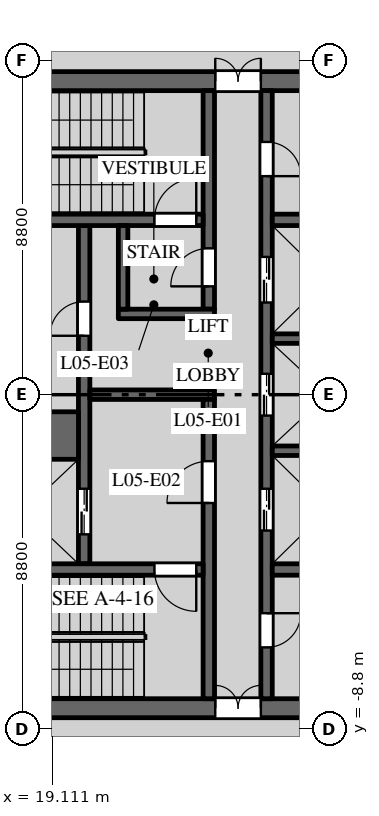
"""IFC4 building model, lengths in metres.
Left out: names, types, materials, properties, quantities, classifications, styles, units other than length and angle.
Written with IfcOpenShell. Run it as: python <this file> out.ifc"""

import sys

from ifc_helpers import new_model, si_unit, direction, frame, frame_2d, origin, place, context, subcontext, project, spatial, rectangle, extrude, element, fill, save


model = new_model("IFC4")
c1 = context("Model", 3, precision=1e-05, world=origin(), true_north=direction((0.0, 1.0)))
c2 = subcontext(c1, "Body", "Model", "MODEL_VIEW")
j1 = project(units=[si_unit("LENGTHUNIT", "METRE"), si_unit("PLANEANGLEUNIT", "RADIAN")], contexts=[c1])
p1 = place(None, origin())
s1 = spatial("IfcSite", under=j1, at=p1, CompositionType="ELEMENT")
p2 = place(p1, origin())
s2 = spatial("IfcBuilding", under=s1, at=p2, CompositionType="ELEMENT")
p3 = place(p2, frame((0.0, 0.0, 30.5)))
s3 = spatial("IfcBuildingStorey", under=s2, at=p3, CompositionType="ELEMENT", Elevation=30.5)
p4 = place(p3, frame((16.5, 8.25, 0.0), z_axis=(0.0, 0.0, 1.0), x_axis=(1.0, 0.0, 0.0)))
e1 = element("IfcWall", 1, at=p4, inside=s3, PredefinedType="SHEAR", context=c2, shape_type="SweptSolid", body=[
    extrude(rectangle(XDim=15.0, YDim=0.5, at=frame_2d((7.5, 0.0))), origin(), (0.0, 0.0, 1.0), 3.7),
])
p5 = place(p4, frame((6.9, 0.0, 0.0)))
e2 = element("IfcOpeningElement", 2, at=p5, cuts=e1, PredefinedType="OPENING", context=c2, shape_type="SweptSolid", body=[
    extrude(rectangle(XDim=1.2, YDim=2.1, at=frame_2d((0.6, 1.05))), frame((0.0, 0.26, 0.0), z_axis=(0.0, -1.0, 0.0), x_axis=(1.0, 0.0, 0.0)), (0.0, 0.0, 1.0), 0.52),
])
p6 = place(p4, frame((12.05, 0.0, 0.0)))
e3 = element("IfcOpeningElement", 3, at=p6, cuts=e1, PredefinedType="OPENING", context=c2, shape_type="SweptSolid", body=[
    extrude(rectangle(XDim=0.9, YDim=2.1, at=frame_2d((0.45, 1.05))), frame((0.0, 0.26, 0.0), z_axis=(0.0, -1.0, 0.0), x_axis=(1.0, 0.0, 0.0)), (0.0, 0.0, 1.0), 0.52),
])
p7 = place(p3, frame((16.5, -8.25, 0.0), z_axis=(0.0, 0.0, 1.0), x_axis=(1.0, 0.0, 0.0)))
e4 = element("IfcWall", 4, at=p7, inside=s3, PredefinedType="SHEAR", context=c2, shape_type="SweptSolid", body=[
    extrude(rectangle(XDim=15.0, YDim=0.5, at=frame_2d((7.5, 0.0))), origin(), (0.0, 0.0, 1.0), 3.7),
])
p8 = place(p7, frame((6.9, 0.0, 0.0)))
e5 = element("IfcOpeningElement", 5, at=p8, cuts=e4, PredefinedType="OPENING", context=c2, shape_type="SweptSolid", body=[
    extrude(rectangle(XDim=1.2, YDim=2.1, at=frame_2d((0.6, 1.05))), frame((0.0, 0.26, 0.0), z_axis=(0.0, -1.0, 0.0), x_axis=(1.0, 0.0, 0.0)), (0.0, 0.0, 1.0), 0.52),
])
p9 = place(p7, frame((12.425, 0.0, 0.0)))
e6 = element("IfcOpeningElement", 6, at=p9, cuts=e4, PredefinedType="OPENING", context=c2, shape_type="SweptSolid", body=[
    extrude(rectangle(XDim=0.9, YDim=2.1, at=frame_2d((0.45, 1.05))), frame((0.0, 0.26, 0.0), z_axis=(0.0, -1.0, 0.0), x_axis=(1.0, 0.0, 0.0)), (0.0, 0.0, 1.0), 0.52),
])
p10 = place(p3, frame((19.95, -4.45, 0.0), z_axis=(0.0, 0.0, 1.0), x_axis=(0.0, 1.0, 0.0)))
e7 = element("IfcWall", 7, at=p10, inside=s3, PredefinedType="SHEAR", context=c2, shape_type="SweptSolid", body=[
    extrude(rectangle(XDim=8.9, YDim=0.3, at=frame_2d((4.45, 0.0))), origin(), (0.0, 0.0, 1.0), 3.7),
])
p11 = place(p10, frame((0.775, 0.0, 0.0)))
e8 = element("IfcOpeningElement", 8, at=p11, cuts=e7, PredefinedType="OPENING", context=c2, shape_type="SweptSolid", body=[
    extrude(rectangle(XDim=1.2, YDim=2.1, at=frame_2d((0.6, 1.05))), frame((0.0, 0.16, 0.0), z_axis=(0.0, -1.0, 0.0), x_axis=(1.0, 0.0, 0.0)), (0.0, 0.0, 1.0), 0.32),
])
p12 = place(p10, frame((6.0, 0.0, 0.0)))
e9 = element("IfcOpeningElement", 9, at=p12, cuts=e7, PredefinedType="OPENING", context=c2, shape_type="SweptSolid", body=[
    extrude(rectangle(XDim=0.9, YDim=2.1, at=frame_2d((0.45, 1.05))), frame((0.0, 0.16, 0.0), z_axis=(0.0, -1.0, 0.0), x_axis=(1.0, 0.0, 0.0)), (0.0, 0.0, 1.0), 0.32),
])
p13 = place(p3, frame((24.75, -8.0, 0.0), z_axis=(0.0, 0.0, 1.0), x_axis=(0.0, 1.0, 0.0)))
e10 = element("IfcWall", 10, at=p13, inside=s3, PredefinedType="SHEAR", context=c2, shape_type="SweptSolid", body=[
    extrude(rectangle(XDim=16.0, YDim=0.3, at=frame_2d((8.0, 0.0))), origin(), (0.0, 0.0, 1.0), 3.7),
])
p14 = place(p13, frame((4.425, 0.0, 0.0)))
e11 = element("IfcOpeningElement", 11, at=p14, cuts=e10, PredefinedType="OPENING", context=c2, shape_type="SweptSolid", body=[
    extrude(rectangle(XDim=1.1, YDim=2.1, at=frame_2d((0.55, 1.05))), frame((0.0, 0.16, 0.0), z_axis=(0.0, -1.0, 0.0), x_axis=(1.0, 0.0, 0.0)), (0.0, 0.0, 1.0), 0.32),
])
p15 = place(p13, frame((7.45, 0.0, 0.0)))
e12 = element("IfcOpeningElement", 12, at=p15, cuts=e10, PredefinedType="OPENING", context=c2, shape_type="SweptSolid", body=[
    extrude(rectangle(XDim=1.1, YDim=2.1, at=frame_2d((0.55, 1.05))), frame((0.0, 0.16, 0.0), z_axis=(0.0, -1.0, 0.0), x_axis=(1.0, 0.0, 0.0)), (0.0, 0.0, 1.0), 0.32),
])
p16 = place(p13, frame((10.425, 0.0, 0.0)))
e13 = element("IfcOpeningElement", 13, at=p16, cuts=e10, PredefinedType="OPENING", context=c2, shape_type="SweptSolid", body=[
    extrude(rectangle(XDim=1.2, YDim=2.1, at=frame_2d((0.6, 1.05))), frame((0.0, 0.16, 0.0), z_axis=(0.0, -1.0, 0.0), x_axis=(1.0, 0.0, 0.0)), (0.0, 0.0, 1.0), 0.32),
])
p17 = place(p13, frame((13.75, 0.0, 0.0)))
e14 = element("IfcOpeningElement", 14, at=p17, cuts=e10, PredefinedType="OPENING", context=c2, shape_type="SweptSolid", body=[
    extrude(rectangle(XDim=0.9, YDim=2.1, at=frame_2d((0.45, 1.05))), frame((0.0, 0.16, 0.0), z_axis=(0.0, -1.0, 0.0), x_axis=(1.0, 0.0, 0.0)), (0.0, 0.0, 1.0), 0.32),
])
p18 = place(p13, frame((1.35, 0.0, 0.0)))
e15 = element("IfcOpeningElement", 15, at=p18, cuts=e10, PredefinedType="OPENING", context=c2, shape_type="SweptSolid", body=[
    extrude(rectangle(XDim=0.9, YDim=2.1, at=frame_2d((0.45, 1.05))), frame((0.0, 0.16, 0.0), z_axis=(0.0, -1.0, 0.0), x_axis=(1.0, 0.0, 0.0)), (0.0, 0.0, 1.0), 0.32),
])
p19 = place(p3, frame((20.1, 0.0, 0.0), z_axis=(0.0, 0.0, 1.0), x_axis=(1.0, 0.0, 0.0)))
e16 = element("IfcWall", 16, at=p19, inside=s3, PredefinedType="SHEAR", context=c2, shape_type="SweptSolid", body=[
    extrude(rectangle(XDim=3.28, YDim=0.25, at=frame_2d((1.64, 0.0))), origin(), (0.0, 0.0, 1.0), 3.7),
])
p20 = place(p3, frame((24.9, 4.6, 0.0), z_axis=(0.0, 0.0, 1.0), x_axis=(1.0, 0.0, 0.0)))
e17 = element("IfcWall", 17, at=p20, inside=s3, PredefinedType="SHEAR", context=c2, shape_type="SweptSolid", body=[
    extrude(rectangle(XDim=6.1, YDim=0.3, at=frame_2d((3.05, 0.0))), origin(), (0.0, 0.0, 1.0), 3.7),
])
p21 = place(p20, frame((4.2, 0.0, 0.0)))
e18 = element("IfcOpeningElement", 18, at=p21, cuts=e17, PredefinedType="OPENING", context=c2, shape_type="SweptSolid", body=[
    extrude(rectangle(XDim=0.9, YDim=2.1, at=frame_2d((0.45, 1.05))), frame((0.0, 0.16, 0.0), z_axis=(0.0, -1.0, 0.0), x_axis=(1.0, 0.0, 0.0)), (0.0, 0.0, 1.0), 0.32),
])
p22 = place(p3, frame((24.9, -4.6, 0.0), z_axis=(0.0, 0.0, 1.0), x_axis=(1.0, 0.0, 0.0)))
e19 = element("IfcWall", 19, at=p22, inside=s3, PredefinedType="SHEAR", context=c2, shape_type="SweptSolid", body=[
    extrude(rectangle(XDim=6.1, YDim=0.3, at=frame_2d((3.05, 0.0))), origin(), (0.0, 0.0, 1.0), 3.7),
])
p23 = place(p3, frame((16.9, -1.075, 0.0), z_axis=(0.0, 0.0, 1.0), x_axis=(1.0, 0.0, 0.0)))
e20 = element("IfcWall", 20, at=p23, inside=s3, PredefinedType="SHEAR", context=c2, shape_type="SweptSolid", body=[
    extrude(rectangle(XDim=2.9, YDim=1.25, at=frame_2d((1.45, 0.0))), origin(), (0.0, 0.0, 1.0), 3.7),
])
for number, where, z_axis, x_axis in (
    (21, (24.9, -1.475, 0.0), (0.0, 0.0, 1.0), (1.0, 0.0, 0.0)),
    (22, (24.9, 1.475, 0.0), (0.0, 0.0, 1.0), (1.0, 0.0, 0.0)),
):
    element("IfcWall", number, at=place(p3, frame(where, z_axis=z_axis, x_axis=x_axis)), inside=s3, PredefinedType="SHEAR", context=c2, shape_type="SweptSolid", body=[
        extrude(rectangle(XDim=2.9, YDim=0.25, at=frame_2d((1.45, 0.0))), origin(), (0.0, 0.0, 1.0), 3.7),
    ])
p24 = place(p3, frame((23.23, 2.25, 0.0), z_axis=(0.0, 0.0, 1.0), x_axis=(0.0, 1.0, 0.0)))
e23 = element("IfcWall", 23, at=p24, inside=s3, PredefinedType="SHEAR", context=c2, shape_type="SweptSolid", body=[
    extrude(rectangle(XDim=5.75, YDim=0.3, at=frame_2d((2.875, 0.0))), origin(), (0.0, 0.0, 1.0), 3.7),
])
p25 = place(p24, frame((0.6, 0.0, 0.0)))
e24 = element("IfcOpeningElement", 24, at=p25, cuts=e23, PredefinedType="OPENING", context=c2, shape_type="SweptSolid", body=[
    extrude(rectangle(XDim=1.0, YDim=2.1, at=frame_2d((0.5, 1.05))), frame((0.0, 0.16, 0.0), z_axis=(0.0, -1.0, 0.0), x_axis=(1.0, 0.0, 0.0)), (0.0, 0.0, 1.0), 0.32),
])
p26 = place(p3, frame((23.23, -8.0, 0.0), z_axis=(0.0, 0.0, 1.0), x_axis=(0.0, 1.0, 0.0)))
e25 = element("IfcWall", 25, at=p26, inside=s3, PredefinedType="SHEAR", context=c2, shape_type="SweptSolid", body=[
    extrude(rectangle(XDim=7.875, YDim=0.3, at=frame_2d((3.938, 0.0))), origin(), (0.0, 0.0, 1.0), 3.7),
])
p27 = place(p26, frame((5.15, 0.0, 0.0)))
e26 = element("IfcOpeningElement", 26, at=p27, cuts=e25, PredefinedType="OPENING", context=c2, shape_type="SweptSolid", body=[
    extrude(rectangle(XDim=1.1, YDim=2.1, at=frame_2d((0.55, 1.05))), frame((0.0, 0.16, 0.0), z_axis=(0.0, -1.0, 0.0), x_axis=(1.0, 0.0, 0.0)), (0.0, 0.0, 1.0), 0.32),
])
p28 = place(p3, frame((16.9, 4.6, 0.0), z_axis=(0.0, 0.0, 1.0), x_axis=(1.0, 0.0, 0.0)))
e27 = element("IfcWall", 27, at=p28, inside=s3, PredefinedType="SHEAR", context=c2, shape_type="SweptSolid", body=[
    extrude(rectangle(XDim=6.18, YDim=0.3, at=frame_2d((3.09, 0.0))), origin(), (0.0, 0.0, 1.0), 3.7),
])
p29 = place(p28, frame((4.9, 0.0, 0.0)))
e28 = element("IfcOpeningElement", 28, at=p29, cuts=e27, PredefinedType="OPENING", context=c2, shape_type="SweptSolid", body=[
    extrude(rectangle(XDim=1.1, YDim=2.1, at=frame_2d((0.55, 1.05))), frame((0.0, 0.16, 0.0), z_axis=(0.0, -1.0, 0.0), x_axis=(1.0, 0.0, 0.0)), (0.0, 0.0, 1.0), 0.32),
])
p30 = place(p3, frame((16.9, -4.6, 0.0), z_axis=(0.0, 0.0, 1.0), x_axis=(1.0, 0.0, 0.0)))
e29 = element("IfcWall", 29, at=p30, inside=s3, PredefinedType="SHEAR", context=c2, shape_type="SweptSolid", body=[
    extrude(rectangle(XDim=6.18, YDim=0.3, at=frame_2d((3.09, 0.0))), origin(), (0.0, 0.0, 1.0), 3.7),
])
p31 = place(p30, frame((4.9, 0.0, 0.0)))
e30 = element("IfcOpeningElement", 30, at=p31, cuts=e29, PredefinedType="OPENING", context=c2, shape_type="SweptSolid", body=[
    extrude(rectangle(XDim=1.1, YDim=2.1, at=frame_2d((0.55, 1.05))), frame((0.0, 0.16, 0.0), z_axis=(0.0, -1.0, 0.0), x_axis=(1.0, 0.0, 0.0)), (0.0, 0.0, 1.0), 0.32),
])
p32 = place(p3, frame((20.85, 2.125, 0.0), z_axis=(0.0, 0.0, 1.0), x_axis=(1.0, 0.0, 0.0)))
e31 = element("IfcWall", 31, at=p32, inside=s3, PredefinedType="SHEAR", context=c2, shape_type="SweptSolid", body=[
    extrude(rectangle(XDim=2.53, YDim=0.25, at=frame_2d((1.265, 0.0))), origin(), (0.0, 0.0, 1.0), 3.7),
])
p33 = place(p3, frame((20.975, 2.25, 0.0), z_axis=(0.0, 0.0, 1.0), x_axis=(0.0, 1.0, 0.0)))
e32 = element("IfcWall", 32, at=p33, inside=s3, PredefinedType="SHEAR", context=c2, shape_type="SweptSolid", body=[
    extrude(rectangle(XDim=2.2, YDim=0.25, at=frame_2d((1.1, 0.0))), origin(), (0.0, 0.0, 1.0), 3.7),
])
p34 = place(p11, origin())
e33 = element("IfcDoor", 33, at=p34, inside=s3, OperationType="DOUBLE_DOOR_SLIDING", PredefinedType="DOOR", context=c2, shape_type="SweptSolid", body=[
    extrude(rectangle(XDim=1.2, YDim=2.1, at=frame_2d((0.6, 1.05))), frame((0.0, 0.025, 0.0), z_axis=(0.0, -1.0, 0.0), x_axis=(1.0, 0.0, 0.0)), (0.0, 0.0, 1.0), 0.05),
])
fill(e8, e33)
p35 = place(p14, origin())
e34 = element("IfcDoor", 34, at=p35, inside=s3, OperationType="DOUBLE_DOOR_SLIDING", PredefinedType="DOOR", context=c2, shape_type="SweptSolid", body=[
    extrude(rectangle(XDim=1.1, YDim=2.1, at=frame_2d((0.55, 1.05))), frame((0.0, 0.025, 0.0), z_axis=(0.0, -1.0, 0.0), x_axis=(1.0, 0.0, 0.0)), (0.0, 0.0, 1.0), 0.05),
])
fill(e11, e34)
p36 = place(p15, origin())
e35 = element("IfcDoor", 35, at=p36, inside=s3, OperationType="DOUBLE_DOOR_SLIDING", PredefinedType="DOOR", context=c2, shape_type="SweptSolid", body=[
    extrude(rectangle(XDim=1.1, YDim=2.1, at=frame_2d((0.55, 1.05))), frame((0.0, 0.025, 0.0), z_axis=(0.0, -1.0, 0.0), x_axis=(1.0, 0.0, 0.0)), (0.0, 0.0, 1.0), 0.05),
])
fill(e12, e35)
p37 = place(p16, origin())
e36 = element("IfcDoor", 36, at=p37, inside=s3, OperationType="DOUBLE_DOOR_SLIDING", PredefinedType="DOOR", context=c2, shape_type="SweptSolid", body=[
    extrude(rectangle(XDim=1.2, YDim=2.1, at=frame_2d((0.6, 1.05))), frame((0.0, 0.025, 0.0), z_axis=(0.0, -1.0, 0.0), x_axis=(1.0, 0.0, 0.0)), (0.0, 0.0, 1.0), 0.05),
])
fill(e13, e36)
p38 = place(p29, origin())
e37 = element("IfcDoor", 37, at=p38, inside=s3, OperationType="SINGLE_SWING_LEFT", PredefinedType="DOOR", context=c2, shape_type="SweptSolid", body=[
    extrude(rectangle(XDim=1.1, YDim=2.1, at=frame_2d((0.55, 1.05))), frame((0.0, 0.025, 0.0), z_axis=(0.0, -1.0, 0.0), x_axis=(1.0, 0.0, 0.0)), (0.0, 0.0, 1.0), 0.05),
])
fill(e28, e37)
p39 = place(p31, origin())
e38 = element("IfcDoor", 38, at=p39, inside=s3, OperationType="SINGLE_SWING_RIGHT", PredefinedType="DOOR", context=c2, shape_type="SweptSolid", body=[
    extrude(rectangle(XDim=1.1, YDim=2.1, at=frame_2d((0.55, 1.05))), frame((0.0, 0.025, 0.0), z_axis=(0.0, -1.0, 0.0), x_axis=(1.0, 0.0, 0.0)), (0.0, 0.0, 1.0), 0.05),
])
fill(e30, e38)
p40 = place(p27, origin())
e39 = element("IfcDoor", 39, at=p40, inside=s3, OperationType="SINGLE_SWING_RIGHT", PredefinedType="DOOR", context=c2, shape_type="SweptSolid", body=[
    extrude(rectangle(XDim=1.1, YDim=2.1, at=frame_2d((0.55, 1.05))), frame((0.0, 0.025, 0.0), z_axis=(0.0, -1.0, 0.0), x_axis=(1.0, 0.0, 0.0)), (0.0, 0.0, 1.0), 0.05),
])
fill(e26, e39)
p41 = place(p25, origin())
e40 = element("IfcDoor", 40, at=p41, inside=s3, OperationType="SINGLE_SWING_RIGHT", PredefinedType="DOOR", context=c2, shape_type="SweptSolid", body=[
    extrude(rectangle(XDim=1.0, YDim=2.1, at=frame_2d((0.5, 1.05))), frame((0.0, 0.025, 0.0), z_axis=(0.0, -1.0, 0.0), x_axis=(1.0, 0.0, 0.0)), (0.0, 0.0, 1.0), 0.05),
])
fill(e24, e40)
p42 = place(p5, origin())
e41 = element("IfcDoor", 41, at=p42, inside=s3, OperationType="DOUBLE_DOOR_DOUBLE_SWING", PredefinedType="DOOR", context=c2, shape_type="SweptSolid", body=[
    extrude(rectangle(XDim=1.2, YDim=2.1, at=frame_2d((0.6, 1.05))), frame((0.0, 0.025, 0.0), z_axis=(0.0, -1.0, 0.0), x_axis=(1.0, 0.0, 0.0)), (0.0, 0.0, 1.0), 0.05),
])
fill(e2, e41)
p43 = place(p8, origin())
e42 = element("IfcDoor", 42, at=p43, inside=s3, OperationType="DOUBLE_DOOR_DOUBLE_SWING", PredefinedType="DOOR", context=c2, shape_type="SweptSolid", body=[
    extrude(rectangle(XDim=1.2, YDim=2.1, at=frame_2d((0.6, 1.05))), frame((0.0, 0.025, 0.0), z_axis=(0.0, -1.0, 0.0), x_axis=(1.0, 0.0, 0.0)), (0.0, 0.0, 1.0), 0.05),
])
fill(e5, e42)
p44 = place(p12, origin())
e43 = element("IfcDoor", 43, at=p44, inside=s3, OperationType="SINGLE_SWING_RIGHT", PredefinedType="DOOR", context=c2, shape_type="SweptSolid", body=[
    extrude(rectangle(XDim=0.9, YDim=2.1, at=frame_2d((0.45, 1.05))), frame((0.0, 0.025, 0.0), z_axis=(0.0, -1.0, 0.0), x_axis=(1.0, 0.0, 0.0)), (0.0, 0.0, 1.0), 0.05),
])
fill(e9, e43)
p45 = place(p17, origin())
e44 = element("IfcDoor", 44, at=p45, inside=s3, OperationType="SINGLE_SWING_LEFT", PredefinedType="DOOR", context=c2, shape_type="SweptSolid", body=[
    extrude(rectangle(XDim=0.9, YDim=2.1, at=frame_2d((0.45, 1.05))), frame((0.0, 0.025, 0.0), z_axis=(0.0, -1.0, 0.0), x_axis=(1.0, 0.0, 0.0)), (0.0, 0.0, 1.0), 0.05),
])
fill(e14, e44)
p46 = place(p18, origin())
e45 = element("IfcDoor", 45, at=p46, inside=s3, OperationType="SINGLE_SWING_RIGHT", PredefinedType="DOOR", context=c2, shape_type="SweptSolid", body=[
    extrude(rectangle(XDim=0.9, YDim=2.1, at=frame_2d((0.45, 1.05))), frame((0.0, 0.025, 0.0), z_axis=(0.0, -1.0, 0.0), x_axis=(1.0, 0.0, 0.0)), (0.0, 0.0, 1.0), 0.05),
])
fill(e15, e45)
save(model, sys.argv[1])
